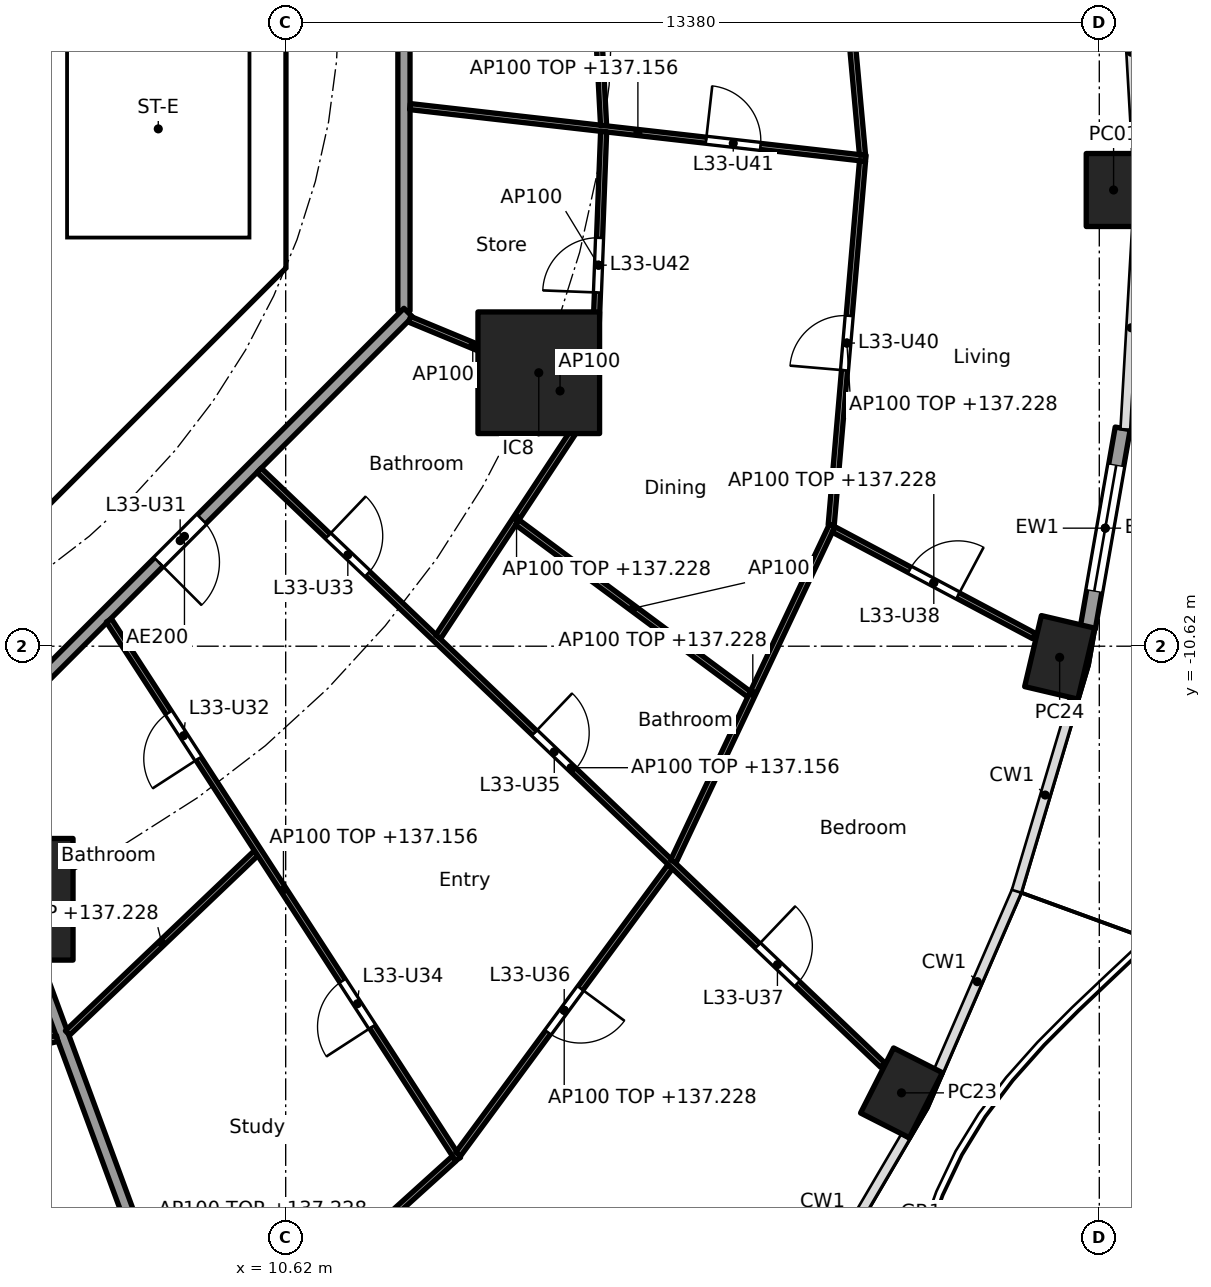
"""IFC4 building model, lengths in metres.
Left out: names, types, materials, properties, quantities, classifications, styles, units other than length and angle.
Written with IfcOpenShell. Run it as: python <this file> out.ifc"""

import sys

from ifc_helpers import new_model, si_unit, direction, frame, frame_2d, origin, origin_2d, place, context, subcontext, project, spatial, polyline, rectangle, hollow_rectangle, outline, extrude, element, fill, save


model = new_model("IFC4")
c1 = context("Model", 3, precision=1e-05, world=origin(), true_north=direction((0.0, 1.0)))
c2 = subcontext(c1, "Body", "Model", "MODEL_VIEW")
j1 = project(units=[si_unit("LENGTHUNIT", "METRE"), si_unit("PLANEANGLEUNIT", "RADIAN")], contexts=[c1])
p1 = place(None, origin())
s1 = spatial("IfcSite", under=j1, at=p1, CompositionType="ELEMENT")
p2 = place(p1, origin())
s2 = spatial("IfcBuilding", under=s1, at=p2, CompositionType="ELEMENT")
p3 = place(p2, frame((0.0, 0.0, 134.4)))
s3 = spatial("IfcBuildingStorey", under=s2, at=p3, CompositionType="ELEMENT", Elevation=134.4)
for number, where, z_axis, x_axis in (
    (1, (24.235, -3.118, 0.0), (0.0, 0.0, 1.0), (0.0, 1.0, 0.0)),
    (2, (20.747, -17.965, 0.0), (0.0, 0.0, 1.0), (0.452, 0.892, 0.0)),
    (3, (23.348, -10.803, 0.0), (0.0, 0.0, 1.0), (0.229, 0.973, 0.0)),
):
    element("IfcColumn", number, at=place(p3, frame(where, z_axis=z_axis, x_axis=x_axis)), inside=s3, PredefinedType="COLUMN", context=c2, shape_type="SweptSolid", body=[
        extrude(hollow_rectangle(XDim=1.2, YDim=0.9, WallThickness=0.04, at=origin_2d()), origin(), (0.0, 0.0, 1.0), 3.7),
    ])
for number, where, z_axis, x_axis in (
    (4, (6.123, -14.782, 0.0), (0.0, 0.0, 1.0), (1.0, 0.0, 0.0)),
    (5, (14.782, -6.123, 0.0), (0.0, 0.0, 1.0), (1.0, 0.0, 0.0)),
):
    element("IfcColumn", number, at=place(p3, frame(where, z_axis=z_axis, x_axis=x_axis)), inside=s3, PredefinedType="COLUMN", context=c2, shape_type="SweptSolid", body=[
        extrude(rectangle(XDim=2.0, YDim=2.0, at=origin_2d()), origin(), (0.0, 0.0, 1.0), 3.7),
    ])
p4 = place(p3, frame((24.385, -7.037, 0.0), z_axis=(0.0, 0.0, 1.0), x_axis=(-0.172163521006, -0.985068384446, 0.0)))
e6 = element("IfcWall", 6, at=p4, inside=s3, PredefinedType="SOLIDWALL", context=c2, shape_type="SweptSolid", body=[
    extrude(rectangle(XDim=3.333, YDim=0.25, at=frame_2d((1.666, 0.0))), origin(), (0.0, 0.0, 1.0), 3.44),
])
p5 = place(p4, frame((0.616, 0.0, 0.0)))
e7 = element("IfcOpeningElement", 7, at=p5, cuts=e6, PredefinedType="OPENING", context=c2, shape_type="SweptSolid", body=[
    extrude(rectangle(XDim=2.1, YDim=2.4, at=frame_2d((1.05, 1.2))), frame((0.0, 0.135, 0.0), z_axis=(0.0, -1.0, 0.0), x_axis=(1.0, 0.0, 0.0)), (0.0, 0.0, 1.0), 0.27),
])
p6 = place(p3, frame((4.613, -9.988, 0.0), z_axis=(0.0, 0.0, 1.0), x_axis=(0.707106781187, 0.707106781187, 0.0)))
e8 = element("IfcWall", 8, at=p6, inside=s3, PredefinedType="SHEAR", context=c2, shape_type="SweptSolid", body=[
    extrude(rectangle(XDim=7.602, YDim=0.6, at=frame_2d((3.801, 0.0))), origin(), (0.0, 0.0, 1.0), 3.44),
])
p7 = place(p6, frame((3.201, 0.0, 0.0)))
e9 = element("IfcOpeningElement", 9, at=p7, cuts=e8, PredefinedType="OPENING", context=c2, shape_type="SweptSolid", body=[
    extrude(rectangle(XDim=1.2, YDim=2.1, at=frame_2d((0.6, 1.05))), frame((0.0, 0.31, 0.0), z_axis=(0.0, -1.0, 0.0), x_axis=(1.0, 0.0, 0.0)), (0.0, 0.0, 1.0), 0.62),
])
p8 = place(p3, origin())
e10 = element("IfcWall", 10, at=p8, inside=s3, PredefinedType="SHEAR", context=c2, shape_type="SweptSolid", body=[
    extrude(outline(polyline([(9.776, -4.401), (10.025, -4.152), (10.025, -3.801), (10.025, 4.152), (9.776, 4.401), (10.2, 4.825), (10.625, 4.401), (10.625, -4.401), (10.2, -4.825), (9.776, -4.401)])), origin(), (0.0, 0.0, 1.0), 3.44),
])
p9 = place(p3, origin())
e11 = element("IfcWall", 11, at=p9, inside=s3, PredefinedType="SOLIDWALL", context=c2, shape_type="SweptSolid", body=[
    extrude(outline(polyline([(7.025, -3.9), (6.7, -3.9), (6.7, 3.9), (7.025, 3.9), (7.025, -3.9)])), origin(), (0.0, 0.0, 1.0), 3.44),
])
p10 = place(p3, origin())
e12 = element("IfcWall", 12, at=p10, inside=s3, PredefinedType="SOLIDWALL", context=c2, shape_type="SweptSolid", body=[
    extrude(outline(polyline([(10.025, -4.1), (6.7, -4.1), (6.7, -3.9), (10.025, -3.9), (10.025, -4.1)])), origin(), (0.0, 0.0, 1.0), 3.44),
])
p11 = place(p3, frame((6.14, -14.829, 0.0), z_axis=(0.0, 0.0, 1.0), x_axis=(0.346169582481, -0.938171956608, 0.0)))
e13 = element("IfcWall", 13, at=p11, inside=s3, PredefinedType="PARTITIONING", context=c2, shape_type="SweptSolid", body=[
    extrude(rectangle(XDim=14.354, YDim=0.2, at=frame_2d((7.177, 0.0))), origin(), (0.0, 0.0, 1.0), 2.828),
])
p12 = place(p3, frame((12.565, -5.104, 0.0), z_axis=(0.0, 0.0, 1.0), x_axis=(0.0, 1.0, 0.0)))
e14 = element("IfcWall", 14, at=p12, inside=s3, PredefinedType="PARTITIONING", context=c2, shape_type="SweptSolid", body=[
    extrude(rectangle(XDim=10.209, YDim=0.2, at=frame_2d((5.104, 0.0))), origin(), (0.0, 0.0, 1.0), 3.44),
])
p13 = place(p3, frame((5.275, -12.494, 0.0), z_axis=(0.0, 0.0, 1.0), x_axis=(0.707106781187, 0.707106781187, 0.0)))
e15 = element("IfcWall", 15, at=p13, inside=s3, PredefinedType="PARTITIONING", context=c2, shape_type="SweptSolid", body=[
    extrude(rectangle(XDim=10.409, YDim=0.2, at=frame_2d((5.205, 0.0))), origin(), (0.0, 0.0, 1.0), 3.44),
])
p14 = place(p13, frame((4.604, 0.0, 0.0)))
e16 = element("IfcOpeningElement", 16, at=p14, cuts=e15, PredefinedType="OPENING", context=c2, shape_type="SweptSolid", body=[
    extrude(rectangle(XDim=1.0, YDim=2.1, at=frame_2d((0.5, 1.05))), frame((0.0, 0.11, 0.0), z_axis=(0.0, -1.0, 0.0), x_axis=(1.0, 0.0, 0.0)), (0.0, 0.0, 1.0), 0.22),
])
p15 = place(p3, frame((12.664, -1.746, 0.0), z_axis=(0.0, 0.0, 1.0), x_axis=(0.993605172276, -0.112910414164, 0.0)))
e17 = element("IfcWall", 17, at=p15, inside=s3, PredefinedType="PARTITIONING", context=c2, shape_type="SweptSolid", body=[
    extrude(rectangle(XDim=7.544, YDim=0.1, at=frame_2d((3.772, 0.0))), origin(), (0.0, 0.0, 1.0), 2.756),
])
p16 = place(p15, frame((4.901, 0.0, 0.0)))
e18 = element("IfcOpeningElement", 18, at=p16, cuts=e17, PredefinedType="OPENING", context=c2, shape_type="SweptSolid", body=[
    extrude(rectangle(XDim=0.9, YDim=2.1, at=frame_2d((0.45, 1.05))), frame((0.0, 0.06, 0.0), z_axis=(0.0, -1.0, 0.0), x_axis=(1.0, 0.0, 0.0)), (0.0, 0.0, 1.0), 0.12),
])
p17 = place(p3, frame((15.848, -2.058, 0.0), z_axis=(0.0, 0.0, 1.0), x_axis=(-0.052509224895, 0.998620439056, 0.0)))
e19 = element("IfcWall", 19, at=p17, inside=s3, PredefinedType="PARTITIONING", context=c2, shape_type="SweptSolid", body=[
    extrude(rectangle(XDim=4.649, YDim=0.1, at=frame_2d((2.325, 0.0))), origin(), (0.0, 0.0, 1.0), 2.828),
])
p18 = place(p17, frame((1.85, 0.0, 0.0)))
e20 = element("IfcOpeningElement", 20, at=p18, cuts=e19, PredefinedType="OPENING", context=c2, shape_type="SweptSolid", body=[
    extrude(rectangle(XDim=0.9, YDim=2.1, at=frame_2d((0.45, 1.05))), frame((0.0, 0.06, 0.0), z_axis=(0.0, -1.0, 0.0), x_axis=(1.0, 0.0, 0.0)), (0.0, 0.0, 1.0), 0.12),
])
p19 = place(p3, frame((15.849, -2.158, 0.0), z_axis=(0.0, 0.0, 1.0), x_axis=(-0.038390448414, -0.999262815014, 0.0)))
e21 = element("IfcWall", 21, at=p19, inside=s3, PredefinedType="PARTITIONING", context=c2, shape_type="SweptSolid", body=[
    extrude(rectangle(XDim=4.394, YDim=0.1, at=frame_2d((2.197, 0.0))), origin(), (0.0, 0.0, 1.0), 3.44),
])
p20 = place(p19, frame((1.747, 0.0, 0.0)))
e22 = element("IfcOpeningElement", 22, at=p20, cuts=e21, PredefinedType="OPENING", context=c2, shape_type="SweptSolid", body=[
    extrude(rectangle(XDim=0.9, YDim=2.1, at=frame_2d((0.45, 1.05))), frame((0.0, 0.06, 0.0), z_axis=(0.0, -1.0, 0.0), x_axis=(1.0, 0.0, 0.0)), (0.0, 0.0, 1.0), 0.12),
])
p21 = place(p3, frame((20.106, -2.542, 0.0), z_axis=(0.0, 0.0, 1.0), x_axis=(-0.090567755363, 0.995890296011, 0.0)))
e23 = element("IfcWall", 23, at=p21, inside=s3, PredefinedType="PARTITIONING", context=c2, shape_type="SweptSolid", body=[
    extrude(rectangle(XDim=6.189, YDim=0.1, at=frame_2d((3.095, 0.0))), origin(), (0.0, 0.0, 1.0), 2.828),
])
p22 = place(p3, frame((20.106, -2.642, 0.0), z_axis=(0.0, 0.0, 1.0), x_axis=(-0.085672025822, -0.996323393277, 0.0)))
e24 = element("IfcWall", 24, at=p22, inside=s3, PredefinedType="PARTITIONING", context=c2, shape_type="SweptSolid", body=[
    extrude(rectangle(XDim=6.007, YDim=0.1, at=frame_2d((3.003, 0.0))), origin(), (0.0, 0.0, 1.0), 2.828),
])
p23 = place(p22, frame((2.554, 0.0, 0.0)))
e25 = element("IfcOpeningElement", 25, at=p23, cuts=e24, PredefinedType="OPENING", context=c2, shape_type="SweptSolid", body=[
    extrude(rectangle(XDim=0.9, YDim=2.1, at=frame_2d((0.45, 1.05))), frame((0.0, 0.06, 0.0), z_axis=(0.0, -1.0, 0.0), x_axis=(1.0, 0.0, 0.0)), (0.0, 0.0, 1.0), 0.12),
])
p24 = place(p3, frame((3.317, -17.878, 0.0), z_axis=(0.0, 0.0, 1.0), x_axis=(0.975095905288, 0.221783623135, 0.0)))
e26 = element("IfcWall", 26, at=p24, inside=s3, PredefinedType="PARTITIONING", context=c2, shape_type="SweptSolid", body=[
    extrude(rectangle(XDim=3.636, YDim=0.1, at=frame_2d((1.818, 0.0))), origin(), (0.0, 0.0, 1.0), 2.828),
])
p25 = place(p24, frame((1.164, 0.0, 0.0)))
e27 = element("IfcOpeningElement", 27, at=p25, cuts=e26, PredefinedType="OPENING", context=c2, shape_type="SweptSolid", body=[
    extrude(rectangle(XDim=0.9, YDim=2.1, at=frame_2d((0.45, 1.05))), frame((0.0, 0.06, 0.0), z_axis=(0.0, -1.0, 0.0), x_axis=(1.0, 0.0, 0.0)), (0.0, 0.0, 1.0), 0.12),
])
p26 = place(p3, frame((7.032, -16.98, 0.0), z_axis=(0.0, 0.0, 1.0), x_axis=(0.723709759148, 0.690104473622, 0.0)))
e28 = element("IfcWall", 28, at=p26, inside=s3, PredefinedType="PARTITIONING", context=c2, shape_type="SweptSolid", body=[
    extrude(rectangle(XDim=4.286, YDim=0.1, at=frame_2d((2.143, 0.0))), origin(), (0.0, 0.0, 1.0), 2.828),
])
p27 = place(p3, frame((9.195, -22.84, 0.0), z_axis=(0.0, 0.0, 1.0), x_axis=(0.741675855479, 0.670758470241, 0.0)))
e29 = element("IfcWall", 29, at=p27, inside=s3, PredefinedType="PARTITIONING", context=c2, shape_type="SweptSolid", body=[
    extrude(rectangle(XDim=5.656, YDim=0.1, at=frame_2d((2.828, 0.0))), origin(), (0.0, 0.0, 1.0), 2.828),
])
p28 = place(p3, frame((7.712, -10.195, 0.0), z_axis=(0.0, 0.0, 1.0), x_axis=(0.543868615753, -0.839170381269, 0.0)))
e30 = element("IfcWall", 30, at=p28, inside=s3, PredefinedType="PARTITIONING", context=c2, shape_type="SweptSolid", body=[
    extrude(rectangle(XDim=10.558, YDim=0.1, at=frame_2d((5.279, 0.0))), origin(), (0.0, 0.0, 1.0), 2.756),
])
p29 = place(p28, frame((1.81, 0.0, 0.0)))
e31 = element("IfcOpeningElement", 31, at=p29, cuts=e30, PredefinedType="OPENING", context=c2, shape_type="SweptSolid", body=[
    extrude(rectangle(XDim=0.9, YDim=2.1, at=frame_2d((0.45, 1.05))), frame((0.0, 0.06, 0.0), z_axis=(0.0, -1.0, 0.0), x_axis=(1.0, 0.0, 0.0)), (0.0, 0.0, 1.0), 0.12),
])
p30 = place(p28, frame((7.064, 0.0, 0.0)))
e32 = element("IfcOpeningElement", 32, at=p30, cuts=e30, PredefinedType="OPENING", context=c2, shape_type="SweptSolid", body=[
    extrude(rectangle(XDim=0.9, YDim=2.1, at=frame_2d((0.45, 1.05))), frame((0.0, 0.06, 0.0), z_axis=(0.0, -1.0, 0.0), x_axis=(1.0, 0.0, 0.0)), (0.0, 0.0, 1.0), 0.12),
])
p31 = place(p3, frame((13.457, -18.973, 0.0), z_axis=(0.0, 0.0, 1.0), x_axis=(0.593532053206, 0.80481035146, 0.0)))
e33 = element("IfcWall", 33, at=p31, inside=s3, PredefinedType="PARTITIONING", context=c2, shape_type="SweptSolid", body=[
    extrude(rectangle(XDim=5.876, YDim=0.1, at=frame_2d((2.938, 0.0))), origin(), (0.0, 0.0, 1.0), 2.828),
])
p32 = place(p31, frame((2.488, 0.0, 0.0)))
e34 = element("IfcOpeningElement", 34, at=p32, cuts=e33, PredefinedType="OPENING", context=c2, shape_type="SweptSolid", body=[
    extrude(rectangle(XDim=0.9, YDim=2.1, at=frame_2d((0.45, 1.05))), frame((0.0, 0.06, 0.0), z_axis=(0.0, -1.0, 0.0), x_axis=(1.0, 0.0, 0.0)), (0.0, 0.0, 1.0), 0.12),
])
p33 = place(p3, frame((10.184, -7.727, 0.0), z_axis=(0.0, 0.0, 1.0), x_axis=(0.723635100101, -0.690182759783, 0.0)))
e35 = element("IfcWall", 35, at=p33, inside=s3, PredefinedType="PARTITIONING", context=c2, shape_type="SweptSolid", body=[
    extrude(rectangle(XDim=14.173, YDim=0.1, at=frame_2d((7.086, 0.0))), origin(), (0.0, 0.0, 1.0), 2.756),
])
p34 = place(p33, frame((1.565, 0.0, 0.0)))
e36 = element("IfcOpeningElement", 36, at=p34, cuts=e35, PredefinedType="OPENING", context=c2, shape_type="SweptSolid", body=[
    extrude(rectangle(XDim=0.9, YDim=2.1, at=frame_2d((0.45, 1.05))), frame((0.0, 0.06, 0.0), z_axis=(0.0, -1.0, 0.0), x_axis=(1.0, 0.0, 0.0)), (0.0, 0.0, 1.0), 0.12),
])
p35 = place(p33, frame((6.257, 0.0, 0.0)))
e37 = element("IfcOpeningElement", 37, at=p35, cuts=e35, PredefinedType="OPENING", context=c2, shape_type="SweptSolid", body=[
    extrude(rectangle(XDim=0.9, YDim=2.1, at=frame_2d((0.45, 1.05))), frame((0.0, 0.06, 0.0), z_axis=(0.0, -1.0, 0.0), x_axis=(1.0, 0.0, 0.0)), (0.0, 0.0, 1.0), 0.12),
])
p36 = place(p33, frame((11.328, 0.0, 0.0)))
e38 = element("IfcOpeningElement", 38, at=p36, cuts=e35, PredefinedType="OPENING", context=c2, shape_type="SweptSolid", body=[
    extrude(rectangle(XDim=0.9, YDim=2.1, at=frame_2d((0.45, 1.05))), frame((0.0, 0.06, 0.0), z_axis=(0.0, -1.0, 0.0), x_axis=(1.0, 0.0, 0.0)), (0.0, 0.0, 1.0), 0.12),
])
p37 = place(p3, frame((13.127, -10.467, 0.0), z_axis=(0.0, 0.0, 1.0), x_axis=(0.550614843759, 0.834759422727, 0.0)))
e39 = element("IfcWall", 39, at=p37, inside=s3, PredefinedType="PARTITIONING", context=c2, shape_type="SweptSolid", body=[
    extrude(rectangle(XDim=4.683, YDim=0.1, at=frame_2d((2.341, 0.0))), origin(), (0.0, 0.0, 1.0), 2.828),
])
p38 = place(p3, frame((16.995, -14.158, 0.0), z_axis=(0.0, 0.0, 1.0), x_axis=(0.427456178439, 0.904036069808, 0.0)))
e40 = element("IfcWall", 40, at=p38, inside=s3, PredefinedType="PARTITIONING", context=c2, shape_type="SweptSolid", body=[
    extrude(rectangle(XDim=6.113, YDim=0.1, at=frame_2d((3.057, 0.0))), origin(), (0.0, 0.0, 1.0), 2.828),
])
p39 = place(p3, frame((14.429, -8.583, 0.0), z_axis=(0.0, 0.0, 1.0), x_axis=(0.803162355549, -0.595760212358, 0.0)))
e41 = element("IfcWall", 41, at=p39, inside=s3, PredefinedType="PARTITIONING", context=c2, shape_type="SweptSolid", body=[
    extrude(rectangle(XDim=4.745, YDim=0.1, at=frame_2d((2.373, 0.0))), origin(), (0.0, 0.0, 1.0), 3.44),
])
p40 = place(p3, frame((12.657, -5.243, 0.0), z_axis=(0.0, 0.0, 1.0), x_axis=(0.923864733477, -0.382719158442, 0.0)))
e42 = element("IfcWall", 42, at=p40, inside=s3, PredefinedType="PARTITIONING", context=c2, shape_type="SweptSolid", body=[
    extrude(rectangle(XDim=2.25, YDim=0.1, at=frame_2d((1.125, 0.0))), origin(), (0.0, 0.0, 1.0), 3.44),
])
p41 = place(p3, frame((19.631, -8.7, 0.0), z_axis=(0.0, 0.0, 1.0), x_axis=(0.883011478612, -0.469351391433, 0.0)))
e43 = element("IfcWall", 43, at=p41, inside=s3, PredefinedType="PARTITIONING", context=c2, shape_type="SweptSolid", body=[
    extrude(rectangle(XDim=3.731, YDim=0.1, at=frame_2d((1.865, 0.0))), origin(), (0.0, 0.0, 1.0), 2.828),
])
p42 = place(p41, frame((1.415, 0.0, 0.0)))
e44 = element("IfcOpeningElement", 44, at=p42, cuts=e43, PredefinedType="OPENING", context=c2, shape_type="SweptSolid", body=[
    extrude(rectangle(XDim=0.9, YDim=2.1, at=frame_2d((0.45, 1.05))), frame((0.0, 0.06, 0.0), z_axis=(0.0, -1.0, 0.0), x_axis=(1.0, 0.0, 0.0)), (0.0, 0.0, 1.0), 0.12),
])
p43 = place(p3, frame((14.774, -6.232, 0.0), z_axis=(0.0, 0.0, 1.0), x_axis=(0.883135211276, -0.46911853364, 0.0)))
e45 = element("IfcWall", 45, at=p43, inside=s3, PredefinedType="PARTITIONING", context=c2, shape_type="SweptSolid", body=[
    extrude(rectangle(XDim=0.811, YDim=0.1, at=frame_2d((0.405, 0.0))), origin(), (0.0, 0.0, 1.0), 3.44),
])
p44 = place(p5, origin())
e46 = element("IfcDoor", 46, at=p44, inside=s3, OperationType="SLIDING_TO_LEFT", PredefinedType="DOOR", context=c2, shape_type="SweptSolid", body=[
    extrude(rectangle(XDim=2.1, YDim=2.4, at=frame_2d((1.05, 1.2))), frame((0.0, 0.025, 0.0), z_axis=(0.0, -1.0, 0.0), x_axis=(1.0, 0.0, 0.0)), (0.0, 0.0, 1.0), 0.05),
])
fill(e7, e46)
p45 = place(p7, origin())
e47 = element("IfcDoor", 47, at=p45, inside=s3, OperationType="SINGLE_SWING_LEFT", PredefinedType="DOOR", context=c2, shape_type="SweptSolid", body=[
    extrude(rectangle(XDim=1.2, YDim=2.1, at=frame_2d((0.6, 1.05))), frame((0.0, 0.025, 0.0), z_axis=(0.0, -1.0, 0.0), x_axis=(1.0, 0.0, 0.0)), (0.0, 0.0, 1.0), 0.05),
])
fill(e9, e47)
p46 = place(p14, frame((1.0, 0.0, 0.0), x_axis=(-1.0, 0.0, 0.0)))
e48 = element("IfcDoor", 48, at=p46, inside=s3, OperationType="SINGLE_SWING_RIGHT", PredefinedType="DOOR", context=c2, shape_type="SweptSolid", body=[
    extrude(rectangle(XDim=1.0, YDim=2.1, at=frame_2d((0.5, 1.05))), frame((0.0, 0.025, 0.0), z_axis=(0.0, -1.0, 0.0), x_axis=(1.0, 0.0, 0.0)), (0.0, 0.0, 1.0), 0.05),
])
fill(e16, e48)
p47 = place(p29, frame((0.9, 0.0, 0.0), x_axis=(-1.0, 0.0, 0.0)))
e49 = element("IfcDoor", 49, at=p47, inside=s3, OperationType="SINGLE_SWING_LEFT", PredefinedType="DOOR", context=c2, shape_type="SweptSolid", body=[
    extrude(rectangle(XDim=0.9, YDim=2.1, at=frame_2d((0.45, 1.05))), frame((0.0, 0.025, 0.0), z_axis=(0.0, -1.0, 0.0), x_axis=(1.0, 0.0, 0.0)), (0.0, 0.0, 1.0), 0.05),
])
fill(e31, e49)
p48 = place(p34, origin())
e50 = element("IfcDoor", 50, at=p48, inside=s3, OperationType="SINGLE_SWING_LEFT", PredefinedType="DOOR", context=c2, shape_type="SweptSolid", body=[
    extrude(rectangle(XDim=0.9, YDim=2.1, at=frame_2d((0.45, 1.05))), frame((0.0, 0.025, 0.0), z_axis=(0.0, -1.0, 0.0), x_axis=(1.0, 0.0, 0.0)), (0.0, 0.0, 1.0), 0.05),
])
fill(e36, e50)
p49 = place(p30, frame((0.9, 0.0, 0.0), x_axis=(-1.0, 0.0, 0.0)))
e51 = element("IfcDoor", 51, at=p49, inside=s3, OperationType="SINGLE_SWING_LEFT", PredefinedType="DOOR", context=c2, shape_type="SweptSolid", body=[
    extrude(rectangle(XDim=0.9, YDim=2.1, at=frame_2d((0.45, 1.05))), frame((0.0, 0.025, 0.0), z_axis=(0.0, -1.0, 0.0), x_axis=(1.0, 0.0, 0.0)), (0.0, 0.0, 1.0), 0.05),
])
fill(e32, e51)
p50 = place(p35, origin())
e52 = element("IfcDoor", 52, at=p50, inside=s3, OperationType="SINGLE_SWING_LEFT", PredefinedType="DOOR", context=c2, shape_type="SweptSolid", body=[
    extrude(rectangle(XDim=0.9, YDim=2.1, at=frame_2d((0.45, 1.05))), frame((0.0, 0.025, 0.0), z_axis=(0.0, -1.0, 0.0), x_axis=(1.0, 0.0, 0.0)), (0.0, 0.0, 1.0), 0.05),
])
fill(e37, e52)
p51 = place(p32, frame((0.9, 0.0, 0.0), x_axis=(-1.0, 0.0, 0.0)))
e53 = element("IfcDoor", 53, at=p51, inside=s3, OperationType="SINGLE_SWING_LEFT", PredefinedType="DOOR", context=c2, shape_type="SweptSolid", body=[
    extrude(rectangle(XDim=0.9, YDim=2.1, at=frame_2d((0.45, 1.05))), frame((0.0, 0.025, 0.0), z_axis=(0.0, -1.0, 0.0), x_axis=(1.0, 0.0, 0.0)), (0.0, 0.0, 1.0), 0.05),
])
fill(e34, e53)
p52 = place(p36, origin())
e54 = element("IfcDoor", 54, at=p52, inside=s3, OperationType="SINGLE_SWING_LEFT", PredefinedType="DOOR", context=c2, shape_type="SweptSolid", body=[
    extrude(rectangle(XDim=0.9, YDim=2.1, at=frame_2d((0.45, 1.05))), frame((0.0, 0.025, 0.0), z_axis=(0.0, -1.0, 0.0), x_axis=(1.0, 0.0, 0.0)), (0.0, 0.0, 1.0), 0.05),
])
fill(e38, e54)
p53 = place(p42, origin())
e55 = element("IfcDoor", 55, at=p53, inside=s3, OperationType="SINGLE_SWING_RIGHT", PredefinedType="DOOR", context=c2, shape_type="SweptSolid", body=[
    extrude(rectangle(XDim=0.9, YDim=2.1, at=frame_2d((0.45, 1.05))), frame((0.0, 0.025, 0.0), z_axis=(0.0, -1.0, 0.0), x_axis=(1.0, 0.0, 0.0)), (0.0, 0.0, 1.0), 0.05),
])
fill(e44, e55)
p54 = place(p23, frame((0.9, 0.0, 0.0), x_axis=(-1.0, 0.0, 0.0)))
e56 = element("IfcDoor", 56, at=p54, inside=s3, OperationType="SINGLE_SWING_LEFT", PredefinedType="DOOR", context=c2, shape_type="SweptSolid", body=[
    extrude(rectangle(XDim=0.9, YDim=2.1, at=frame_2d((0.45, 1.05))), frame((0.0, 0.025, 0.0), z_axis=(0.0, -1.0, 0.0), x_axis=(1.0, 0.0, 0.0)), (0.0, 0.0, 1.0), 0.05),
])
fill(e25, e56)
p55 = place(p16, origin())
e57 = element("IfcDoor", 57, at=p55, inside=s3, OperationType="SINGLE_SWING_LEFT", PredefinedType="DOOR", context=c2, shape_type="SweptSolid", body=[
    extrude(rectangle(XDim=0.9, YDim=2.1, at=frame_2d((0.45, 1.05))), frame((0.0, 0.025, 0.0), z_axis=(0.0, -1.0, 0.0), x_axis=(1.0, 0.0, 0.0)), (0.0, 0.0, 1.0), 0.05),
])
fill(e18, e57)
p56 = place(p20, frame((0.9, 0.0, 0.0), x_axis=(-1.0, 0.0, 0.0)))
e58 = element("IfcDoor", 58, at=p56, inside=s3, OperationType="SINGLE_SWING_LEFT", PredefinedType="DOOR", context=c2, shape_type="SweptSolid", body=[
    extrude(rectangle(XDim=0.9, YDim=2.1, at=frame_2d((0.45, 1.05))), frame((0.0, 0.025, 0.0), z_axis=(0.0, -1.0, 0.0), x_axis=(1.0, 0.0, 0.0)), (0.0, 0.0, 1.0), 0.05),
])
fill(e22, e58)
save(model, sys.argv[1])
